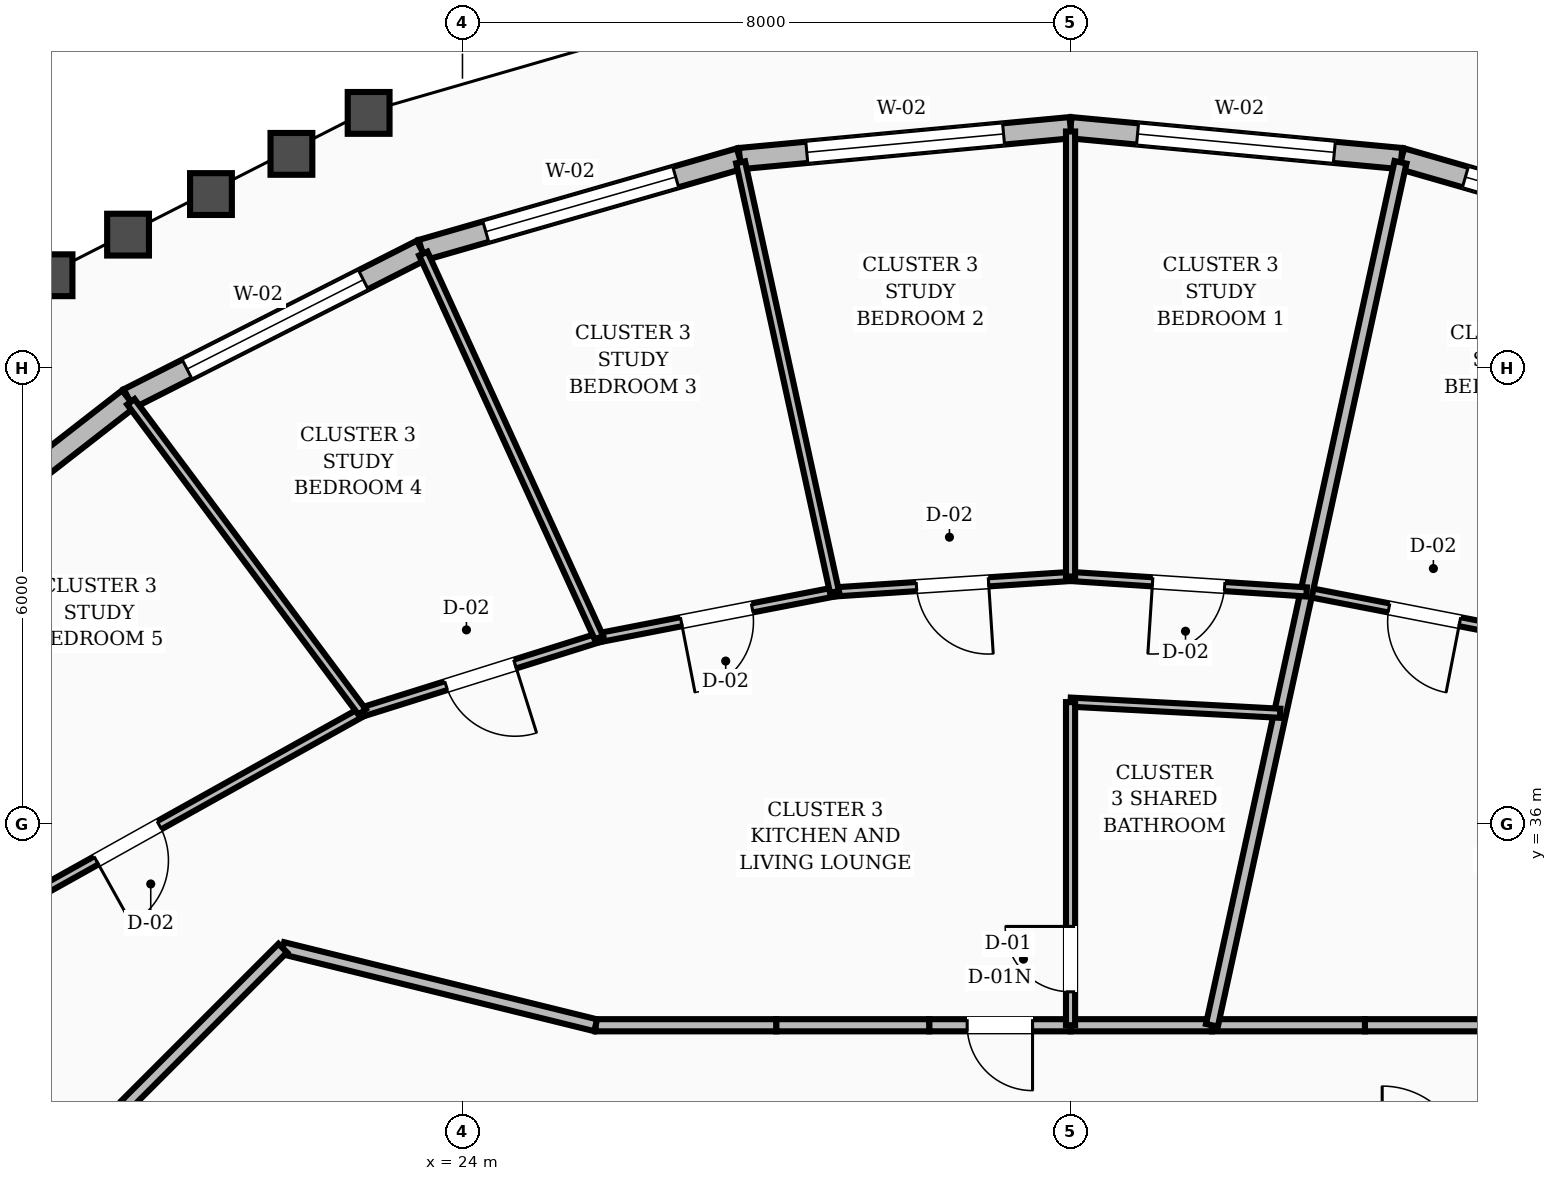
"""IFC4 building model, lengths in metres.
Left out: names, types, materials, properties, quantities, classifications, styles, units other than length and angle.
Written with IfcOpenShell. Run it as: python <this file> out.ifc"""

import sys

from ifc_helpers import new_model, si_unit, direction, frame, frame_2d, origin, place, context, subcontext, project, spatial, rectangle, extrude, element, fill, save


model = new_model("IFC4")
c1 = context("Model", 3, precision=1e-05, world=origin(), true_north=direction((0.0, 1.0)))
c2 = subcontext(c1, "Body", "Model", "MODEL_VIEW")
j1 = project(units=[si_unit("LENGTHUNIT", "METRE"), si_unit("PLANEANGLEUNIT", "RADIAN")], contexts=[c1])
p1 = place(None, origin())
s1 = spatial("IfcSite", under=j1, at=p1, CompositionType="ELEMENT")
p2 = place(p1, origin())
s2 = spatial("IfcBuilding", under=s1, at=p2, CompositionType="ELEMENT")
p3 = place(p2, frame((0.0, 0.0, 232.8)))
s3 = spatial("IfcBuildingStorey", under=s2, at=p3, CompositionType="ELEMENT", Elevation=232.8)
p4 = place(p3, frame((40.536, 43.548, 0.0), z_axis=(0.0, 0.0, 1.0), x_axis=(-0.961001713186, 0.276542414927, 0.0)))
e1 = element("IfcWall", 1, at=p4, inside=s3, PredefinedType="STANDARD", context=c2, shape_type="SweptSolid", body=[
    extrude(rectangle(XDim=4.354, YDim=0.28, at=frame_2d((2.177, 0.0))), origin(), (0.0, 0.0, 1.0), 2.88),
])
p5 = place(p4, frame((0.877, 0.0, 0.8)))
e2 = element("IfcOpeningElement", 2, at=p5, cuts=e1, PredefinedType="OPENING", context=c2, shape_type="SweptSolid", body=[
    extrude(rectangle(XDim=2.6, YDim=1.65, at=frame_2d((1.3, 0.825))), frame((0.0, 0.15, 0.0), z_axis=(0.0, -1.0, 0.0), x_axis=(1.0, 0.0, 0.0)), (0.0, 0.0, 1.0), 0.3),
])
p6 = place(p3, frame((36.352, 44.752, 0.0), z_axis=(0.0, 0.0, 1.0), x_axis=(-0.995665801827, 0.093003285276, 0.0)))
e3 = element("IfcWall", 3, at=p6, inside=s3, PredefinedType="STANDARD", context=c2, shape_type="SweptSolid", body=[
    extrude(rectangle(XDim=4.371, YDim=0.28, at=frame_2d((2.186, 0.0))), origin(), (0.0, 0.0, 1.0), 2.88),
])
p7 = place(p6, frame((0.885, 0.0, 0.8)))
e4 = element("IfcOpeningElement", 4, at=p7, cuts=e3, PredefinedType="OPENING", context=c2, shape_type="SweptSolid", body=[
    extrude(rectangle(XDim=2.6, YDim=1.65, at=frame_2d((1.3, 0.825))), frame((0.0, 0.15, 0.0), z_axis=(0.0, -1.0, 0.0), x_axis=(1.0, 0.0, 0.0)), (0.0, 0.0, 1.0), 0.3),
])
p8 = place(p3, frame((32.0, 45.158, 0.0), z_axis=(0.0, 0.0, 1.0), x_axis=(-0.995665801827, -0.093003285276, 0.0)))
e5 = element("IfcWall", 5, at=p8, inside=s3, PredefinedType="STANDARD", context=c2, shape_type="SweptSolid", body=[
    extrude(rectangle(XDim=4.371, YDim=0.28, at=frame_2d((2.186, 0.0))), origin(), (0.0, 0.0, 1.0), 2.88),
])
p9 = place(p8, frame((0.885, 0.0, 0.8)))
e6 = element("IfcOpeningElement", 6, at=p9, cuts=e5, PredefinedType="OPENING", context=c2, shape_type="SweptSolid", body=[
    extrude(rectangle(XDim=2.6, YDim=1.65, at=frame_2d((1.3, 0.825))), frame((0.0, 0.15, 0.0), z_axis=(0.0, -1.0, 0.0), x_axis=(1.0, 0.0, 0.0)), (0.0, 0.0, 1.0), 0.3),
])
p10 = place(p3, frame((27.648, 44.752, 0.0), z_axis=(0.0, 0.0, 1.0), x_axis=(-0.961001713186, -0.276542414927, 0.0)))
e7 = element("IfcWall", 7, at=p10, inside=s3, PredefinedType="STANDARD", context=c2, shape_type="SweptSolid", body=[
    extrude(rectangle(XDim=4.354, YDim=0.28, at=frame_2d((2.177, 0.0))), origin(), (0.0, 0.0, 1.0), 2.88),
])
p11 = place(p10, frame((0.877, 0.0, 0.8)))
e8 = element("IfcOpeningElement", 8, at=p11, cuts=e7, PredefinedType="OPENING", context=c2, shape_type="SweptSolid", body=[
    extrude(rectangle(XDim=2.6, YDim=1.65, at=frame_2d((1.3, 0.825))), frame((0.0, 0.15, 0.0), z_axis=(0.0, -1.0, 0.0), x_axis=(1.0, 0.0, 0.0)), (0.0, 0.0, 1.0), 0.3),
])
p12 = place(p3, frame((23.464, 43.548, 0.0), z_axis=(0.0, 0.0, 1.0), x_axis=(-0.891906133231, -0.452220576162, 0.0)))
e9 = element("IfcWall", 9, at=p12, inside=s3, PredefinedType="STANDARD", context=c2, shape_type="SweptSolid", body=[
    extrude(rectangle(XDim=4.324, YDim=0.28, at=frame_2d((2.162, 0.0))), origin(), (0.0, 0.0, 1.0), 2.88),
])
p13 = place(p12, frame((0.862, 0.0, 0.8)))
e10 = element("IfcOpeningElement", 10, at=p13, cuts=e9, PredefinedType="OPENING", context=c2, shape_type="SweptSolid", body=[
    extrude(rectangle(XDim=2.6, YDim=1.65, at=frame_2d((1.3, 0.825))), frame((0.0, 0.15, 0.0), z_axis=(0.0, -1.0, 0.0), x_axis=(1.0, 0.0, 0.0)), (0.0, 0.0, 1.0), 0.3),
])
p14 = place(p3, frame((19.607, 41.592, 0.0), z_axis=(0.0, 0.0, 1.0), x_axis=(-0.789112773216, -0.614248346475, 0.0)))
e11 = element("IfcWall", 11, at=p14, inside=s3, PredefinedType="STANDARD", context=c2, shape_type="SweptSolid", body=[
    extrude(rectangle(XDim=4.283, YDim=0.28, at=frame_2d((2.142, 0.0))), origin(), (0.0, 0.0, 1.0), 2.88),
])
p15 = place(p3, frame((38.248, 33.35, 0.0), z_axis=(0.0, 0.0, 1.0), x_axis=(-1.0, 0.0, 0.0)))
e12 = element("IfcWall", 12, at=p15, inside=s3, PredefinedType="SOLIDWALL", context=c2, shape_type="SweptSolid", body=[
    extrude(rectangle(XDim=2.375, YDim=0.16, at=frame_2d((1.188, 0.0))), origin(), (0.0, 0.0, 1.0), 2.87),
])
p16 = place(p3, frame((35.873, 33.35, 0.0), z_axis=(0.0, 0.0, 1.0), x_axis=(-1.0, 0.0, 0.0)))
e13 = element("IfcWall", 13, at=p16, inside=s3, PredefinedType="SOLIDWALL", context=c2, shape_type="SweptSolid", body=[
    extrude(rectangle(XDim=2.013, YDim=0.16, at=frame_2d((1.006, 0.0))), origin(), (0.0, 0.0, 1.0), 2.87),
])
p17 = place(p3, frame((33.86, 33.35, 0.0), z_axis=(0.0, 0.0, 1.0), x_axis=(-1.0, 0.0, 0.0)))
e14 = element("IfcWall", 14, at=p17, inside=s3, PredefinedType="SOLIDWALL", context=c2, shape_type="SweptSolid", body=[
    extrude(rectangle(XDim=1.86, YDim=0.16, at=frame_2d((0.93, 0.0))), origin(), (0.0, 0.0, 1.0), 2.87),
])
p18 = place(p3, frame((32.0, 33.35, 0.0), z_axis=(0.0, 0.0, 1.0), x_axis=(-1.0, 0.0, 0.0)))
e15 = element("IfcWall", 15, at=p18, inside=s3, PredefinedType="SOLIDWALL", context=c2, shape_type="SweptSolid", body=[
    extrude(rectangle(XDim=1.86, YDim=0.16, at=frame_2d((0.93, 0.0))), origin(), (0.0, 0.0, 1.0), 2.87),
])
p19 = place(p18, frame((0.5, 0.0, 0.0)))
e16 = element("IfcOpeningElement", 16, at=p19, cuts=e15, PredefinedType="OPENING", context=c2, shape_type="SweptSolid", body=[
    extrude(rectangle(XDim=0.86, YDim=2.1, at=frame_2d((0.43, 1.05))), frame((0.0, 0.09, 0.0), z_axis=(0.0, -1.0, 0.0), x_axis=(1.0, 0.0, 0.0)), (0.0, 0.0, 1.0), 0.18),
])
p20 = place(p3, frame((30.14, 33.35, 0.0), z_axis=(0.0, 0.0, 1.0), x_axis=(-1.0, 0.0, 0.0)))
e17 = element("IfcWall", 17, at=p20, inside=s3, PredefinedType="SOLIDWALL", context=c2, shape_type="SweptSolid", body=[
    extrude(rectangle(XDim=2.013, YDim=0.16, at=frame_2d((1.006, 0.0))), origin(), (0.0, 0.0, 1.0), 2.87),
])
p21 = place(p3, frame((28.127, 33.35, 0.0), z_axis=(0.0, 0.0, 1.0), x_axis=(-1.0, 0.0, 0.0)))
e18 = element("IfcWall", 18, at=p21, inside=s3, PredefinedType="SOLIDWALL", context=c2, shape_type="SweptSolid", body=[
    extrude(rectangle(XDim=2.375, YDim=0.16, at=frame_2d((1.188, 0.0))), origin(), (0.0, 0.0, 1.0), 2.87),
])
p22 = place(p3, frame((25.752, 33.35, 0.0), z_axis=(0.0, 0.0, 1.0), x_axis=(-0.970939799552, 0.239323850978, 0.0)))
e19 = element("IfcWall", 19, at=p22, inside=s3, PredefinedType="SOLIDWALL", context=c2, shape_type="SweptSolid", body=[
    extrude(rectangle(XDim=4.241, YDim=0.16, at=frame_2d((2.12, 0.0))), origin(), (0.0, 0.0, 1.0), 2.87),
])
p23 = place(p3, frame((21.635, 34.365, 0.0), z_axis=(0.0, 0.0, 1.0), x_axis=(-0.707106781187, -0.707106781187, 0.0)))
e20 = element("IfcWall", 20, at=p23, inside=s3, PredefinedType="SOLIDWALL", context=c2, shape_type="SweptSolid", body=[
    extrude(rectangle(XDim=2.916, YDim=0.16, at=frame_2d((1.458, 0.0))), origin(), (0.0, 0.0, 1.0), 2.87),
])
p24 = place(p3, frame((38.205, 38.449, 0.0), z_axis=(0.0, 0.0, 1.0), x_axis=(-0.981645564912, 0.190714406608, 0.0)))
e21 = element("IfcWall", 21, at=p24, inside=s3, PredefinedType="PARTITIONING", context=c2, shape_type="SweptSolid", body=[
    extrude(rectangle(XDim=3.157, YDim=0.12, at=frame_2d((1.578, 0.0))), origin(), (0.0, 0.0, 1.0), 2.87),
])
p25 = place(p24, frame((1.103, 0.0, 0.0)))
e22 = element("IfcOpeningElement", 22, at=p25, cuts=e21, PredefinedType="OPENING", context=c2, shape_type="SweptSolid", body=[
    extrude(rectangle(XDim=0.95, YDim=2.1, at=frame_2d((0.475, 1.05))), frame((0.0, 0.07, 0.0), z_axis=(0.0, -1.0, 0.0), x_axis=(1.0, 0.0, 0.0)), (0.0, 0.0, 1.0), 0.14),
])
p26 = place(p3, frame((33.86, 33.35, 0.0), z_axis=(0.0, 0.0, 1.0), x_axis=(0.213514549004, 0.976939884212, 0.0)))
e23 = element("IfcWall", 23, at=p26, inside=s3, PredefinedType="SOLIDWALL", context=c2, shape_type="SweptSolid", body=[
    extrude(rectangle(XDim=11.621, YDim=0.16, at=frame_2d((5.811, 0.0))), origin(), (0.0, 0.0, 1.0), 2.87),
])
p27 = place(p3, frame((34.757, 37.455, 0.0), z_axis=(0.0, 0.0, 1.0), x_axis=(-0.998591320033, 0.053060112648, 0.0)))
e24 = element("IfcWall", 24, at=p27, inside=s3, PredefinedType="PARTITIONING", context=c2, shape_type="SweptSolid", body=[
    extrude(rectangle(XDim=2.761, YDim=0.12, at=frame_2d((1.38, 0.0))), origin(), (0.0, 0.0, 1.0), 2.87),
])
p28 = place(p3, frame((32.0, 33.35, 0.0), z_axis=(0.0, 0.0, 1.0), x_axis=(0.0, 1.0, 0.0)))
e25 = element("IfcWall", 25, at=p28, inside=s3, PredefinedType="PARTITIONING", context=c2, shape_type="SweptSolid", body=[
    extrude(rectangle(XDim=4.251, YDim=0.12, at=frame_2d((2.125, 0.0))), origin(), (0.0, 0.0, 1.0), 2.87),
])
p29 = place(p28, frame((0.44, 0.0, 0.0)))
e26 = element("IfcOpeningElement", 26, at=p29, cuts=e25, PredefinedType="OPENING", context=c2, shape_type="SweptSolid", body=[
    extrude(rectangle(XDim=0.86, YDim=2.1, at=frame_2d((0.43, 1.05))), frame((0.0, 0.07, 0.0), z_axis=(0.0, -1.0, 0.0), x_axis=(1.0, 0.0, 0.0)), (0.0, 0.0, 1.0), 0.14),
])
p30 = place(p3, frame((35.106, 39.051, 0.0), z_axis=(0.0, 0.0, 1.0), x_axis=(-0.997862906262, 0.06534233165, 0.0)))
e27 = element("IfcWall", 27, at=p30, inside=s3, PredefinedType="PARTITIONING", context=c2, shape_type="SweptSolid", body=[
    extrude(rectangle(XDim=3.112, YDim=0.12, at=frame_2d((1.556, 0.0))), origin(), (0.0, 0.0, 1.0), 2.87),
])
p31 = place(p30, frame((1.081, 0.0, 0.0)))
e28 = element("IfcOpeningElement", 28, at=p31, cuts=e27, PredefinedType="OPENING", context=c2, shape_type="SweptSolid", body=[
    extrude(rectangle(XDim=0.95, YDim=2.1, at=frame_2d((0.475, 1.05))), frame((0.0, 0.07, 0.0), z_axis=(0.0, -1.0, 0.0), x_axis=(1.0, 0.0, 0.0)), (0.0, 0.0, 1.0), 0.14),
])
p32 = place(p3, frame((32.0, 39.254, 0.0), z_axis=(0.0, 0.0, 1.0), x_axis=(-0.997862906262, -0.06534233165, 0.0)))
e29 = element("IfcWall", 29, at=p32, inside=s3, PredefinedType="PARTITIONING", context=c2, shape_type="SweptSolid", body=[
    extrude(rectangle(XDim=3.112, YDim=0.12, at=frame_2d((1.556, 0.0))), origin(), (0.0, 0.0, 1.0), 2.87),
])
p33 = place(p32, frame((1.081, 0.0, 0.0)))
e30 = element("IfcOpeningElement", 30, at=p33, cuts=e29, PredefinedType="OPENING", context=c2, shape_type="SweptSolid", body=[
    extrude(rectangle(XDim=0.95, YDim=2.1, at=frame_2d((0.475, 1.05))), frame((0.0, 0.07, 0.0), z_axis=(0.0, -1.0, 0.0), x_axis=(1.0, 0.0, 0.0)), (0.0, 0.0, 1.0), 0.14),
])
p34 = place(p3, frame((32.0, 39.254, 0.0), z_axis=(0.0, 0.0, 1.0), x_axis=(0.0, 1.0, 0.0)))
e31 = element("IfcWall", 31, at=p34, inside=s3, PredefinedType="PARTITIONING", context=c2, shape_type="SweptSolid", body=[
    extrude(rectangle(XDim=5.854, YDim=0.12, at=frame_2d((2.927, 0.0))), origin(), (0.0, 0.0, 1.0), 2.87),
])
p35 = place(p3, frame((28.894, 39.051, 0.0), z_axis=(0.0, 0.0, 1.0), x_axis=(-0.981645564912, -0.190714406608, 0.0)))
e32 = element("IfcWall", 32, at=p35, inside=s3, PredefinedType="PARTITIONING", context=c2, shape_type="SweptSolid", body=[
    extrude(rectangle(XDim=3.157, YDim=0.12, at=frame_2d((1.578, 0.0))), origin(), (0.0, 0.0, 1.0), 2.87),
])
p36 = place(p35, frame((1.103, 0.0, 0.0)))
e33 = element("IfcOpeningElement", 33, at=p36, cuts=e32, PredefinedType="OPENING", context=c2, shape_type="SweptSolid", body=[
    extrude(rectangle(XDim=0.95, YDim=2.1, at=frame_2d((0.475, 1.05))), frame((0.0, 0.07, 0.0), z_axis=(0.0, -1.0, 0.0), x_axis=(1.0, 0.0, 0.0)), (0.0, 0.0, 1.0), 0.14),
])
p37 = place(p3, frame((28.894, 39.051, 0.0), z_axis=(0.0, 0.0, 1.0), x_axis=(-0.213524463296, 0.976937717346, 0.0)))
e34 = element("IfcWall", 34, at=p37, inside=s3, PredefinedType="PARTITIONING", context=c2, shape_type="SweptSolid", body=[
    extrude(rectangle(XDim=5.786, YDim=0.12, at=frame_2d((2.893, 0.0))), origin(), (0.0, 0.0, 1.0), 2.87),
])
p38 = place(p3, frame((25.795, 38.449, 0.0), z_axis=(0.0, 0.0, 1.0), x_axis=(-0.954134762398, -0.299377446018, 0.0)))
e35 = element("IfcWall", 35, at=p38, inside=s3, PredefinedType="PARTITIONING", context=c2, shape_type="SweptSolid", body=[
    extrude(rectangle(XDim=3.265, YDim=0.12, at=frame_2d((1.633, 0.0))), origin(), (0.0, 0.0, 1.0), 2.87),
])
p39 = place(p38, frame((1.158, 0.0, 0.0)))
e36 = element("IfcOpeningElement", 36, at=p39, cuts=e35, PredefinedType="OPENING", context=c2, shape_type="SweptSolid", body=[
    extrude(rectangle(XDim=0.95, YDim=2.1, at=frame_2d((0.475, 1.05))), frame((0.0, 0.07, 0.0), z_axis=(0.0, -1.0, 0.0), x_axis=(1.0, 0.0, 0.0)), (0.0, 0.0, 1.0), 0.14),
])
p40 = place(p3, frame((25.795, 38.449, 0.0), z_axis=(0.0, 0.0, 1.0), x_axis=(-0.415854245642, 0.909431276338, 0.0)))
e37 = element("IfcWall", 37, at=p40, inside=s3, PredefinedType="PARTITIONING", context=c2, shape_type="SweptSolid", body=[
    extrude(rectangle(XDim=5.557, YDim=0.12, at=frame_2d((2.778, 0.0))), origin(), (0.0, 0.0, 1.0), 2.87),
])
p41 = place(p3, frame((22.68, 37.471, 0.0), z_axis=(0.0, 0.0, 1.0), x_axis=(-0.873183674394, -0.487391291234, 0.0)))
e38 = element("IfcWall", 38, at=p41, inside=s3, PredefinedType="PARTITIONING", context=c2, shape_type="SweptSolid", body=[
    extrude(rectangle(XDim=7.062, YDim=0.12, at=frame_2d((3.531, 0.0))), origin(), (0.0, 0.0, 1.0), 2.87),
])
p42 = place(p41, frame((3.056, 0.0, 0.0)))
e39 = element("IfcOpeningElement", 39, at=p42, cuts=e38, PredefinedType="OPENING", context=c2, shape_type="SweptSolid", body=[
    extrude(rectangle(XDim=0.95, YDim=2.1, at=frame_2d((0.475, 1.05))), frame((0.0, 0.07, 0.0), z_axis=(0.0, -1.0, 0.0), x_axis=(1.0, 0.0, 0.0)), (0.0, 0.0, 1.0), 0.14),
])
p43 = place(p3, frame((22.68, 37.471, 0.0), z_axis=(0.0, 0.0, 1.0), x_axis=(-0.597695366931, 0.801723299119, 0.0)))
e40 = element("IfcWall", 40, at=p43, inside=s3, PredefinedType="PARTITIONING", context=c2, shape_type="SweptSolid", body=[
    extrude(rectangle(XDim=5.09, YDim=0.12, at=frame_2d((2.545, 0.0))), origin(), (0.0, 0.0, 1.0), 2.87),
])
p44 = place(p5, origin())
e41 = element("IfcWindow", 41, at=p44, inside=s3, PartitioningType="SINGLE_PANEL", PredefinedType="WINDOW", context=c2, shape_type="SweptSolid", body=[
    extrude(rectangle(XDim=2.6, YDim=1.65, at=frame_2d((1.3, 0.825))), frame((0.0, 0.03, 0.0), z_axis=(0.0, -1.0, 0.0), x_axis=(1.0, 0.0, 0.0)), (0.0, 0.0, 1.0), 0.06),
])
fill(e2, e41)
p45 = place(p7, origin())
e42 = element("IfcWindow", 42, at=p45, inside=s3, PartitioningType="SINGLE_PANEL", PredefinedType="WINDOW", context=c2, shape_type="SweptSolid", body=[
    extrude(rectangle(XDim=2.6, YDim=1.65, at=frame_2d((1.3, 0.825))), frame((0.0, 0.03, 0.0), z_axis=(0.0, -1.0, 0.0), x_axis=(1.0, 0.0, 0.0)), (0.0, 0.0, 1.0), 0.06),
])
fill(e4, e42)
p46 = place(p9, origin())
e43 = element("IfcWindow", 43, at=p46, inside=s3, PartitioningType="SINGLE_PANEL", PredefinedType="WINDOW", context=c2, shape_type="SweptSolid", body=[
    extrude(rectangle(XDim=2.6, YDim=1.65, at=frame_2d((1.3, 0.825))), frame((0.0, 0.03, 0.0), z_axis=(0.0, -1.0, 0.0), x_axis=(1.0, 0.0, 0.0)), (0.0, 0.0, 1.0), 0.06),
])
fill(e6, e43)
p47 = place(p11, origin())
e44 = element("IfcWindow", 44, at=p47, inside=s3, PartitioningType="SINGLE_PANEL", PredefinedType="WINDOW", context=c2, shape_type="SweptSolid", body=[
    extrude(rectangle(XDim=2.6, YDim=1.65, at=frame_2d((1.3, 0.825))), frame((0.0, 0.03, 0.0), z_axis=(0.0, -1.0, 0.0), x_axis=(1.0, 0.0, 0.0)), (0.0, 0.0, 1.0), 0.06),
])
fill(e8, e44)
p48 = place(p13, origin())
e45 = element("IfcWindow", 45, at=p48, inside=s3, PartitioningType="SINGLE_PANEL", PredefinedType="WINDOW", context=c2, shape_type="SweptSolid", body=[
    extrude(rectangle(XDim=2.6, YDim=1.65, at=frame_2d((1.3, 0.825))), frame((0.0, 0.03, 0.0), z_axis=(0.0, -1.0, 0.0), x_axis=(1.0, 0.0, 0.0)), (0.0, 0.0, 1.0), 0.06),
])
fill(e10, e45)
p49 = place(p25, origin())
e46 = element("IfcDoor", 46, at=p49, inside=s3, OperationType="SINGLE_SWING_LEFT", PredefinedType="DOOR", context=c2, shape_type="SweptSolid", body=[
    extrude(rectangle(XDim=0.95, YDim=2.1, at=frame_2d((0.475, 1.05))), frame((0.0, 0.025, 0.0), z_axis=(0.0, -1.0, 0.0), x_axis=(1.0, 0.0, 0.0)), (0.0, 0.0, 1.0), 0.05),
])
fill(e22, e46)
p50 = place(p29, origin())
e47 = element("IfcDoor", 47, at=p50, inside=s3, OperationType="SINGLE_SWING_RIGHT", PredefinedType="DOOR", context=c2, shape_type="SweptSolid", body=[
    extrude(rectangle(XDim=0.86, YDim=2.1, at=frame_2d((0.43, 1.05))), frame((0.0, 0.025, 0.0), z_axis=(0.0, -1.0, 0.0), x_axis=(1.0, 0.0, 0.0)), (0.0, 0.0, 1.0), 0.05),
])
fill(e26, e47)
p51 = place(p19, origin())
e48 = element("IfcDoor", 48, at=p51, inside=s3, OperationType="SINGLE_SWING_LEFT", PredefinedType="DOOR", context=c2, shape_type="SweptSolid", body=[
    extrude(rectangle(XDim=0.86, YDim=2.1, at=frame_2d((0.43, 1.05))), frame((0.0, 0.025, 0.0), z_axis=(0.0, -1.0, 0.0), x_axis=(1.0, 0.0, 0.0)), (0.0, 0.0, 1.0), 0.05),
])
fill(e16, e48)
p52 = place(p31, origin())
e49 = element("IfcDoor", 49, at=p52, inside=s3, OperationType="SINGLE_SWING_RIGHT", PredefinedType="DOOR", context=c2, shape_type="SweptSolid", body=[
    extrude(rectangle(XDim=0.95, YDim=2.1, at=frame_2d((0.475, 1.05))), frame((0.0, 0.025, 0.0), z_axis=(0.0, -1.0, 0.0), x_axis=(1.0, 0.0, 0.0)), (0.0, 0.0, 1.0), 0.05),
])
fill(e28, e49)
p53 = place(p33, origin())
e50 = element("IfcDoor", 50, at=p53, inside=s3, OperationType="SINGLE_SWING_LEFT", PredefinedType="DOOR", context=c2, shape_type="SweptSolid", body=[
    extrude(rectangle(XDim=0.95, YDim=2.1, at=frame_2d((0.475, 1.05))), frame((0.0, 0.025, 0.0), z_axis=(0.0, -1.0, 0.0), x_axis=(1.0, 0.0, 0.0)), (0.0, 0.0, 1.0), 0.05),
])
fill(e30, e50)
p54 = place(p36, origin())
e51 = element("IfcDoor", 51, at=p54, inside=s3, OperationType="SINGLE_SWING_RIGHT", PredefinedType="DOOR", context=c2, shape_type="SweptSolid", body=[
    extrude(rectangle(XDim=0.95, YDim=2.1, at=frame_2d((0.475, 1.05))), frame((0.0, 0.025, 0.0), z_axis=(0.0, -1.0, 0.0), x_axis=(1.0, 0.0, 0.0)), (0.0, 0.0, 1.0), 0.05),
])
fill(e33, e51)
p55 = place(p39, origin())
e52 = element("IfcDoor", 52, at=p55, inside=s3, OperationType="SINGLE_SWING_LEFT", PredefinedType="DOOR", context=c2, shape_type="SweptSolid", body=[
    extrude(rectangle(XDim=0.95, YDim=2.1, at=frame_2d((0.475, 1.05))), frame((0.0, 0.025, 0.0), z_axis=(0.0, -1.0, 0.0), x_axis=(1.0, 0.0, 0.0)), (0.0, 0.0, 1.0), 0.05),
])
fill(e36, e52)
p56 = place(p42, origin())
e53 = element("IfcDoor", 53, at=p56, inside=s3, OperationType="SINGLE_SWING_RIGHT", PredefinedType="DOOR", context=c2, shape_type="SweptSolid", body=[
    extrude(rectangle(XDim=0.95, YDim=2.1, at=frame_2d((0.475, 1.05))), frame((0.0, 0.025, 0.0), z_axis=(0.0, -1.0, 0.0), x_axis=(1.0, 0.0, 0.0)), (0.0, 0.0, 1.0), 0.05),
])
fill(e39, e53)
save(model, sys.argv[1])
